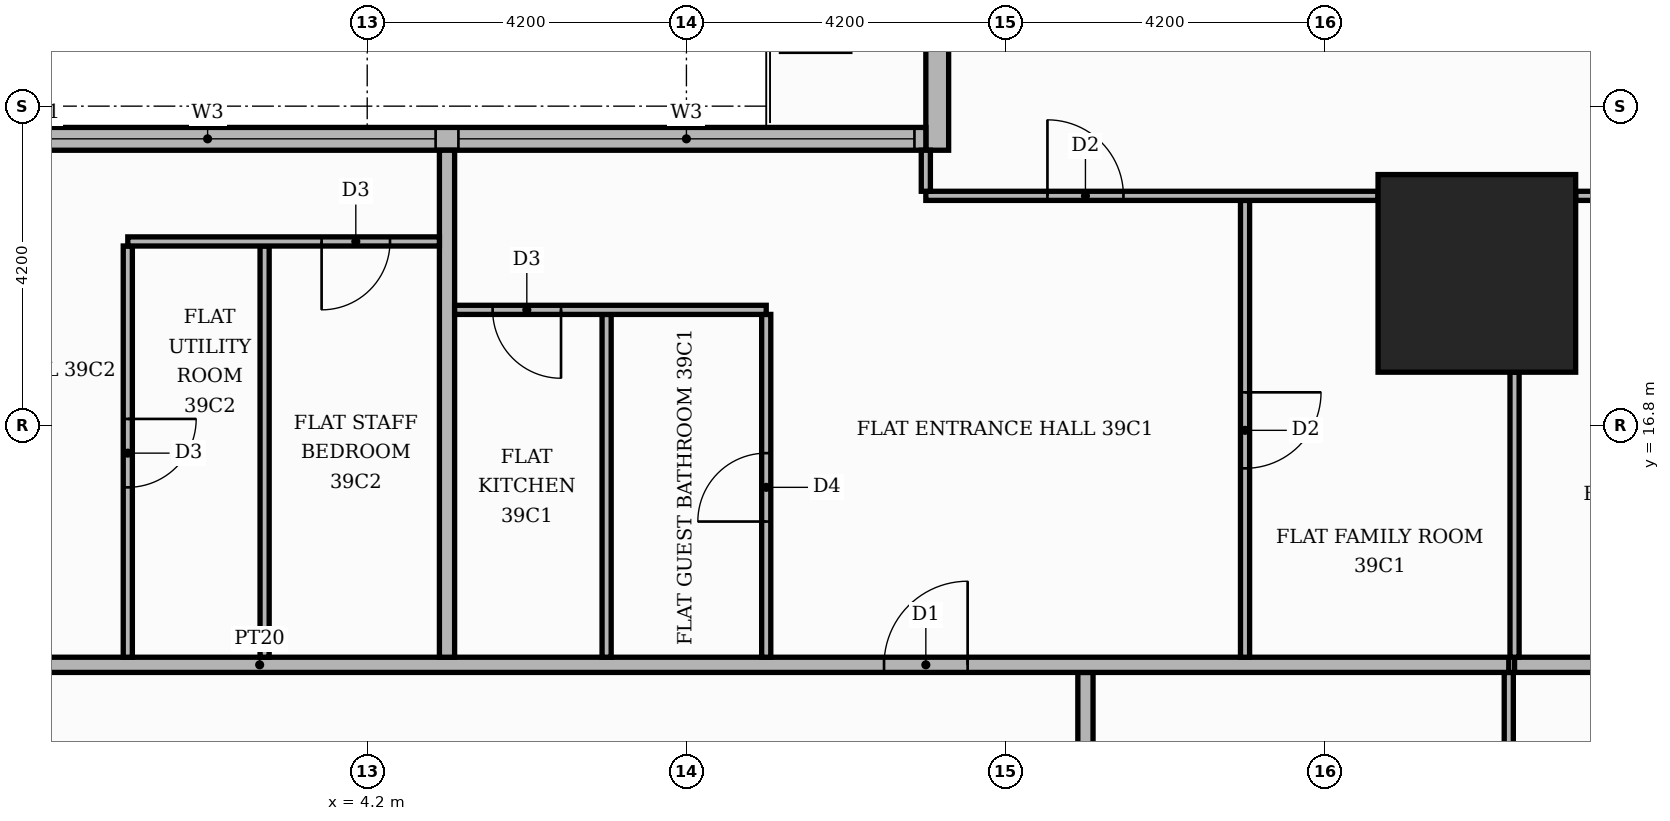
"""IFC4 building model, lengths in metres.
Left out: names, types, materials, properties, quantities, classifications, styles, units other than length and angle.
Written with IfcOpenShell. Run it as: python <this file> out.ifc"""

import sys

from ifc_helpers import new_model, si_unit, direction, frame, frame_2d, origin, origin_2d, place, context, subcontext, project, spatial, rectangle, extrude, element, fill, save


model = new_model("IFC4")
c1 = context("Model", 3, precision=1e-05, world=origin(), true_north=direction((0.0, 1.0)))
c2 = subcontext(c1, "Body", "Model", "MODEL_VIEW")
j1 = project(units=[si_unit("LENGTHUNIT", "METRE"), si_unit("PLANEANGLEUNIT", "RADIAN")], contexts=[c1])
p1 = place(None, origin())
s1 = spatial("IfcSite", under=j1, at=p1, CompositionType="ELEMENT")
p2 = place(p1, origin())
s2 = spatial("IfcBuilding", under=s1, at=p2, CompositionType="ELEMENT")
p3 = place(p2, frame((0.0, 0.0, 165.0)))
s3 = spatial("IfcBuildingStorey", under=s2, at=p3, CompositionType="ELEMENT", Elevation=165.0)
p4 = place(p3, frame((18.8, 18.8, 0.0), z_axis=(0.0, 0.0, 1.0), x_axis=(1.0, 0.0, 0.0)))
e1 = element("IfcColumn", 1, at=p4, inside=s3, PredefinedType="COLUMN", context=c2, shape_type="SweptSolid", body=[
    extrude(rectangle(XDim=2.6, YDim=2.6, at=origin_2d()), origin(), (0.0, 0.0, 1.0), 3.9),
])
p5 = place(p3, frame((11.7, 25.42, 0.0), z_axis=(0.0, 0.0, 1.0), x_axis=(0.0, -1.0, 0.0)))
e2 = element("IfcWall", 2, at=p5, inside=s3, PredefinedType="STANDARD", context=c2, shape_type="SweptSolid", body=[
    extrude(rectangle(XDim=5.0, YDim=0.3, at=frame_2d((2.5, 0.0))), origin(), (0.0, 0.0, 1.0), 3.48),
])
p6 = place(p5, frame((1.42, 0.0, 0.0)))
e3 = element("IfcOpeningElement", 3, at=p6, cuts=e2, PredefinedType="OPENING", context=c2, shape_type="SweptSolid", body=[
    extrude(rectangle(XDim=1.8, YDim=2.4, at=frame_2d((0.9, 1.2))), frame((0.0, 0.16, 0.0), z_axis=(0.0, -1.0, 0.0), x_axis=(1.0, 0.0, 0.0)), (0.0, 0.0, 1.0), 0.32),
])
p7 = place(p3, frame((11.55, 20.57, 0.0), z_axis=(0.0, 0.0, 1.0), x_axis=(-1.0, 0.0, 0.0)))
e4 = element("IfcWall", 4, at=p7, inside=s3, PredefinedType="STANDARD", context=c2, shape_type="SweptSolid", body=[
    extrude(rectangle(XDim=23.4, YDim=0.3, at=frame_2d((11.7, 0.0))), origin(), (0.0, 0.0, 1.0), 3.48),
])
p8 = place(p7, frame((0.15, 0.0, 0.9)))
e5 = element("IfcOpeningElement", 5, at=p8, cuts=e4, PredefinedType="OPENING", context=c2, shape_type="SweptSolid", body=[
    extrude(rectangle(XDim=6.0, YDim=2.1, at=frame_2d((3.0, 1.05))), frame((0.0, 0.16, 0.0), z_axis=(0.0, -1.0, 0.0), x_axis=(1.0, 0.0, 0.0)), (0.0, 0.0, 1.0), 0.32),
])
p9 = place(p7, frame((6.45, 0.0, 0.9)))
e6 = element("IfcOpeningElement", 6, at=p9, cuts=e4, PredefinedType="OPENING", context=c2, shape_type="SweptSolid", body=[
    extrude(rectangle(XDim=6.0, YDim=2.1, at=frame_2d((3.0, 1.05))), frame((0.0, 0.16, 0.0), z_axis=(0.0, -1.0, 0.0), x_axis=(1.0, 0.0, 0.0)), (0.0, 0.0, 1.0), 0.32),
])
p10 = place(p7, frame((12.75, 0.0, 0.9)))
e7 = element("IfcOpeningElement", 7, at=p10, cuts=e4, PredefinedType="OPENING", context=c2, shape_type="SweptSolid", body=[
    extrude(rectangle(XDim=6.0, YDim=2.1, at=frame_2d((3.0, 1.05))), frame((0.0, 0.16, 0.0), z_axis=(0.0, -1.0, 0.0), x_axis=(1.0, 0.0, 0.0)), (0.0, 0.0, 1.0), 0.32),
])
p11 = place(p7, frame((19.05, 0.0, 0.9)))
e8 = element("IfcOpeningElement", 8, at=p11, cuts=e4, PredefinedType="OPENING", context=c2, shape_type="SweptSolid", body=[
    extrude(rectangle(XDim=3.9, YDim=2.1, at=frame_2d((1.95, 1.05))), frame((0.0, 0.16, 0.0), z_axis=(0.0, -1.0, 0.0), x_axis=(1.0, 0.0, 0.0)), (0.0, 0.0, 1.0), 0.32),
])
p12 = place(p3, frame((19.22, 9.21, 0.0), z_axis=(0.0, 0.0, 1.0), x_axis=(0.0, 1.0, 0.0)))
e9 = element("IfcWall", 9, at=p12, inside=s3, PredefinedType="PARTITIONING", context=c2, shape_type="SweptSolid", body=[
    extrude(rectangle(XDim=4.34, YDim=0.12, at=frame_2d((2.17, 0.0))), origin(), (0.0, 0.0, 1.0), 3.48),
])
p13 = place(p12, frame((1.74, 0.0, 0.0)))
e10 = element("IfcOpeningElement", 10, at=p13, cuts=e9, PredefinedType="OPENING", context=c2, shape_type="SweptSolid", body=[
    extrude(rectangle(XDim=0.9, YDim=2.1, at=frame_2d((0.45, 1.05))), frame((0.0, 0.07, 0.0), z_axis=(0.0, -1.0, 0.0), x_axis=(1.0, 0.0, 0.0)), (0.0, 0.0, 1.0), 0.14),
])
p14 = place(p3, frame((13.65, 11.1, 0.0), z_axis=(0.0, 0.0, 1.0), x_axis=(0.0, 1.0, 0.0)))
e11 = element("IfcWall", 11, at=p14, inside=s3, PredefinedType="PARTITIONING", context=c2, shape_type="SweptSolid", body=[
    extrude(rectangle(XDim=2.45, YDim=0.2, at=frame_2d((1.225, 0.0))), origin(), (0.0, 0.0, 1.0), 3.48),
])
p15 = place(p3, frame((-13.65, 13.65, 0.0), z_axis=(0.0, 0.0, 1.0), x_axis=(1.0, 0.0, 0.0)))
e12 = element("IfcWall", 12, at=p15, inside=s3, PredefinedType="PARTITIONING", context=c2, shape_type="SweptSolid", body=[
    extrude(rectangle(XDim=32.87, YDim=0.2, at=frame_2d((16.435, 0.0))), origin(), (0.0, 0.0, 1.0), 3.48),
])
p16 = place(p15, frame((24.65, 0.0, 0.0)))
e13 = element("IfcOpeningElement", 13, at=p16, cuts=e12, PredefinedType="OPENING", context=c2, shape_type="SweptSolid", body=[
    extrude(rectangle(XDim=1.1, YDim=2.4, at=frame_2d((0.55, 1.2))), frame((0.0, 0.11, 0.0), z_axis=(0.0, -1.0, 0.0), x_axis=(1.0, 0.0, 0.0)), (0.0, 0.0, 1.0), 0.22),
])
p17 = place(p15, frame((12.05, 0.0, 0.0)))
e14 = element("IfcOpeningElement", 14, at=p17, cuts=e12, PredefinedType="OPENING", context=c2, shape_type="SweptSolid", body=[
    extrude(rectangle(XDim=1.1, YDim=2.4, at=frame_2d((0.55, 1.2))), frame((0.0, 0.11, 0.0), z_axis=(0.0, -1.0, 0.0), x_axis=(1.0, 0.0, 0.0)), (0.0, 0.0, 1.0), 0.22),
])
p18 = place(p3, frame((19.296, 13.65, 0.0), z_axis=(0.0, 0.0, 1.0), x_axis=(1.0, 0.0, 0.0)))
e15 = element("IfcWall", 15, at=p18, inside=s3, PredefinedType="PARTITIONING", context=c2, shape_type="SweptSolid", body=[
    extrude(rectangle(XDim=6.124, YDim=0.2, at=frame_2d((3.062, 0.0))), origin(), (0.0, 0.0, 1.0), 3.48),
])
p19 = place(p3, frame((1.05, 13.75, 0.0), z_axis=(0.0, 0.0, 1.0), x_axis=(0.0, 1.0, 0.0)))
e16 = element("IfcWall", 16, at=p19, inside=s3, PredefinedType="PARTITIONING", context=c2, shape_type="SweptSolid", body=[
    extrude(rectangle(XDim=5.41, YDim=0.12, at=frame_2d((2.705, 0.0))), origin(), (0.0, 0.0, 1.0), 3.48),
])
p20 = place(p19, frame((2.235, 0.0, 0.0)))
e17 = element("IfcOpeningElement", 17, at=p20, cuts=e16, PredefinedType="OPENING", context=c2, shape_type="SweptSolid", body=[
    extrude(rectangle(XDim=0.9, YDim=2.1, at=frame_2d((0.45, 1.05))), frame((0.0, 0.07, 0.0), z_axis=(0.0, -1.0, 0.0), x_axis=(1.0, 0.0, 0.0)), (0.0, 0.0, 1.0), 0.14),
])
p21 = place(p3, frame((2.85, 13.75, 0.0), z_axis=(0.0, 0.0, 1.0), x_axis=(0.0, 1.0, 0.0)))
e18 = element("IfcWall", 18, at=p21, inside=s3, PredefinedType="PARTITIONING", context=c2, shape_type="SweptSolid", body=[
    extrude(rectangle(XDim=5.41, YDim=0.12, at=frame_2d((2.705, 0.0))), origin(), (0.0, 0.0, 1.0), 3.48),
])
p22 = place(p3, frame((5.25, 13.75, 0.0), z_axis=(0.0, 0.0, 1.0), x_axis=(0.0, 1.0, 0.0)))
e19 = element("IfcWall", 19, at=p22, inside=s3, PredefinedType="PARTITIONING", context=c2, shape_type="SweptSolid", body=[
    extrude(rectangle(XDim=6.67, YDim=0.2, at=frame_2d((3.335, 0.0))), origin(), (0.0, 0.0, 1.0), 3.48),
])
p23 = place(p3, frame((7.35, 13.75, 0.0), z_axis=(0.0, 0.0, 1.0), x_axis=(0.0, 1.0, 0.0)))
e20 = element("IfcWall", 20, at=p23, inside=s3, PredefinedType="PARTITIONING", context=c2, shape_type="SweptSolid", body=[
    extrude(rectangle(XDim=4.51, YDim=0.12, at=frame_2d((2.255, 0.0))), origin(), (0.0, 0.0, 1.0), 3.48),
])
p24 = place(p3, frame((9.45, 13.75, 0.0), z_axis=(0.0, 0.0, 1.0), x_axis=(0.0, 1.0, 0.0)))
e21 = element("IfcWall", 21, at=p24, inside=s3, PredefinedType="PARTITIONING", context=c2, shape_type="SweptSolid", body=[
    extrude(rectangle(XDim=4.51, YDim=0.12, at=frame_2d((2.255, 0.0))), origin(), (0.0, 0.0, 1.0), 3.48),
])
p25 = place(p24, frame((1.785, 0.0, 0.0)))
e22 = element("IfcOpeningElement", 22, at=p25, cuts=e21, PredefinedType="OPENING", context=c2, shape_type="SweptSolid", body=[
    extrude(rectangle(XDim=0.9, YDim=2.1, at=frame_2d((0.45, 1.05))), frame((0.0, 0.07, 0.0), z_axis=(0.0, -1.0, 0.0), x_axis=(1.0, 0.0, 0.0)), (0.0, 0.0, 1.0), 0.14),
])
p26 = place(p3, frame((15.75, 13.75, 0.0), z_axis=(0.0, 0.0, 1.0), x_axis=(0.0, 1.0, 0.0)))
e23 = element("IfcWall", 23, at=p26, inside=s3, PredefinedType="PARTITIONING", context=c2, shape_type="SweptSolid", body=[
    extrude(rectangle(XDim=6.01, YDim=0.12, at=frame_2d((3.005, 0.0))), origin(), (0.0, 0.0, 1.0), 3.48),
])
p27 = place(p26, frame((2.485, 0.0, 0.0)))
e24 = element("IfcOpeningElement", 24, at=p27, cuts=e23, PredefinedType="OPENING", context=c2, shape_type="SweptSolid", body=[
    extrude(rectangle(XDim=1.0, YDim=2.1, at=frame_2d((0.5, 1.05))), frame((0.0, 0.07, 0.0), z_axis=(0.0, -1.0, 0.0), x_axis=(1.0, 0.0, 0.0)), (0.0, 0.0, 1.0), 0.14),
])
p28 = place(p3, frame((19.296, 13.75, 0.0), z_axis=(0.0, 0.0, 1.0), x_axis=(0.0, 1.0, 0.0)))
e25 = element("IfcWall", 25, at=p28, inside=s3, PredefinedType="PARTITIONING", context=c2, shape_type="SweptSolid", body=[
    extrude(rectangle(XDim=3.75, YDim=0.12, at=frame_2d((1.875, 0.0))), origin(), (0.0, 0.0, 1.0), 3.48),
])
p29 = place(p3, frame((5.35, 18.32, 0.0), z_axis=(0.0, 0.0, 1.0), x_axis=(1.0, 0.0, 0.0)))
e26 = element("IfcWall", 26, at=p29, inside=s3, PredefinedType="PARTITIONING", context=c2, shape_type="SweptSolid", body=[
    extrude(rectangle(XDim=4.1, YDim=0.12, at=frame_2d((2.05, 0.0))), origin(), (0.0, 0.0, 1.0), 3.48),
])
p30 = place(p29, frame((0.5, 0.0, 0.0)))
e27 = element("IfcOpeningElement", 27, at=p30, cuts=e26, PredefinedType="OPENING", context=c2, shape_type="SweptSolid", body=[
    extrude(rectangle(XDim=0.9, YDim=2.1, at=frame_2d((0.45, 1.05))), frame((0.0, 0.07, 0.0), z_axis=(0.0, -1.0, 0.0), x_axis=(1.0, 0.0, 0.0)), (0.0, 0.0, 1.0), 0.14),
])
p31 = place(p3, frame((1.05, 19.22, 0.0), z_axis=(0.0, 0.0, 1.0), x_axis=(1.0, 0.0, 0.0)))
e28 = element("IfcWall", 28, at=p31, inside=s3, PredefinedType="PARTITIONING", context=c2, shape_type="SweptSolid", body=[
    extrude(rectangle(XDim=4.1, YDim=0.12, at=frame_2d((2.05, 0.0))), origin(), (0.0, 0.0, 1.0), 3.48),
])
p32 = place(p31, frame((2.55, 0.0, 0.0)))
e29 = element("IfcOpeningElement", 29, at=p32, cuts=e28, PredefinedType="OPENING", context=c2, shape_type="SweptSolid", body=[
    extrude(rectangle(XDim=0.9, YDim=2.1, at=frame_2d((0.45, 1.05))), frame((0.0, 0.07, 0.0), z_axis=(0.0, -1.0, 0.0), x_axis=(1.0, 0.0, 0.0)), (0.0, 0.0, 1.0), 0.14),
])
p33 = place(p3, frame((11.55, 19.82, 0.0), z_axis=(0.0, 0.0, 1.0), x_axis=(1.0, 0.0, 0.0)))
e30 = element("IfcWall", 30, at=p33, inside=s3, PredefinedType="PARTITIONING", context=c2, shape_type="SweptSolid", body=[
    extrude(rectangle(XDim=5.95, YDim=0.12, at=frame_2d((2.975, 0.0))), origin(), (0.0, 0.0, 1.0), 3.48),
])
p34 = place(p33, frame((1.6, 0.0, 0.0)))
e31 = element("IfcOpeningElement", 31, at=p34, cuts=e30, PredefinedType="OPENING", context=c2, shape_type="SweptSolid", body=[
    extrude(rectangle(XDim=1.0, YDim=2.1, at=frame_2d((0.5, 1.05))), frame((0.0, 0.07, 0.0), z_axis=(0.0, -1.0, 0.0), x_axis=(1.0, 0.0, 0.0)), (0.0, 0.0, 1.0), 0.14),
])
p35 = place(p3, frame((20.1, 19.82, 0.0), z_axis=(0.0, 0.0, 1.0), x_axis=(1.0, 0.0, 0.0)))
e32 = element("IfcWall", 32, at=p35, inside=s3, PredefinedType="PARTITIONING", context=c2, shape_type="SweptSolid", body=[
    extrude(rectangle(XDim=5.32, YDim=0.12, at=frame_2d((2.66, 0.0))), origin(), (0.0, 0.0, 1.0), 3.48),
])
p36 = place(p35, frame((2.36, 0.0, 0.0)))
e33 = element("IfcOpeningElement", 33, at=p36, cuts=e32, PredefinedType="OPENING", context=c2, shape_type="SweptSolid", body=[
    extrude(rectangle(XDim=0.9, YDim=2.1, at=frame_2d((0.45, 1.05))), frame((0.0, 0.07, 0.0), z_axis=(0.0, -1.0, 0.0), x_axis=(1.0, 0.0, 0.0)), (0.0, 0.0, 1.0), 0.14),
])
p37 = place(p3, frame((11.55, 19.88, 0.0), z_axis=(0.0, 0.0, 1.0), x_axis=(0.0, 1.0, 0.0)))
e34 = element("IfcWall", 34, at=p37, inside=s3, PredefinedType="PARTITIONING", context=c2, shape_type="SweptSolid", body=[
    extrude(rectangle(XDim=0.54, YDim=0.12, at=frame_2d((0.27, 0.0))), origin(), (0.0, 0.0, 1.0), 3.48),
])
p38 = place(p8, origin())
e35 = element("IfcWindow", 35, at=p38, inside=s3, PartitioningType="SINGLE_PANEL", PredefinedType="WINDOW", context=c2, shape_type="SweptSolid", body=[
    extrude(rectangle(XDim=6.0, YDim=2.1, at=frame_2d((3.0, 1.05))), frame((0.0, 0.03, 0.0), z_axis=(0.0, -1.0, 0.0), x_axis=(1.0, 0.0, 0.0)), (0.0, 0.0, 1.0), 0.06),
])
fill(e5, e35)
p39 = place(p9, origin())
e36 = element("IfcWindow", 36, at=p39, inside=s3, PartitioningType="SINGLE_PANEL", PredefinedType="WINDOW", context=c2, shape_type="SweptSolid", body=[
    extrude(rectangle(XDim=6.0, YDim=2.1, at=frame_2d((3.0, 1.05))), frame((0.0, 0.03, 0.0), z_axis=(0.0, -1.0, 0.0), x_axis=(1.0, 0.0, 0.0)), (0.0, 0.0, 1.0), 0.06),
])
fill(e6, e36)
p40 = place(p16, origin())
e37 = element("IfcDoor", 37, at=p40, inside=s3, OperationType="SINGLE_SWING_RIGHT", PredefinedType="DOOR", context=c2, shape_type="SweptSolid", body=[
    extrude(rectangle(XDim=1.1, YDim=2.4, at=frame_2d((0.55, 1.2))), frame((0.0, 0.025, 0.0), z_axis=(0.0, -1.0, 0.0), x_axis=(1.0, 0.0, 0.0)), (0.0, 0.0, 1.0), 0.05),
])
fill(e13, e37)
p41 = place(p27, frame((1.0, 0.0, 0.0), z_axis=(0.0, 0.0, 1.0), x_axis=(-1.0, 0.0, 0.0)))
e38 = element("IfcDoor", 38, at=p41, inside=s3, OperationType="SINGLE_SWING_RIGHT", PredefinedType="DOOR", context=c2, shape_type="SweptSolid", body=[
    extrude(rectangle(XDim=1.0, YDim=2.1, at=frame_2d((0.5, 1.05))), frame((0.0, 0.025, 0.0), z_axis=(0.0, -1.0, 0.0), x_axis=(1.0, 0.0, 0.0)), (0.0, 0.0, 1.0), 0.05),
])
fill(e24, e38)
p42 = place(p25, origin())
e39 = element("IfcDoor", 39, at=p42, inside=s3, OperationType="SINGLE_SWING_LEFT", PredefinedType="DOOR", context=c2, shape_type="SweptSolid", body=[
    extrude(rectangle(XDim=0.9, YDim=2.1, at=frame_2d((0.45, 1.05))), frame((0.0, 0.025, 0.0), z_axis=(0.0, -1.0, 0.0), x_axis=(1.0, 0.0, 0.0)), (0.0, 0.0, 1.0), 0.05),
])
fill(e22, e39)
p43 = place(p30, frame((0.9, 0.0, 0.0), z_axis=(0.0, 0.0, 1.0), x_axis=(-1.0, 0.0, 0.0)))
e40 = element("IfcDoor", 40, at=p43, inside=s3, OperationType="SINGLE_SWING_RIGHT", PredefinedType="DOOR", context=c2, shape_type="SweptSolid", body=[
    extrude(rectangle(XDim=0.9, YDim=2.1, at=frame_2d((0.45, 1.05))), frame((0.0, 0.025, 0.0), z_axis=(0.0, -1.0, 0.0), x_axis=(1.0, 0.0, 0.0)), (0.0, 0.0, 1.0), 0.05),
])
fill(e27, e40)
p44 = place(p34, origin())
e41 = element("IfcDoor", 41, at=p44, inside=s3, OperationType="SINGLE_SWING_LEFT", PredefinedType="DOOR", context=c2, shape_type="SweptSolid", body=[
    extrude(rectangle(XDim=1.0, YDim=2.1, at=frame_2d((0.5, 1.05))), frame((0.0, 0.025, 0.0), z_axis=(0.0, -1.0, 0.0), x_axis=(1.0, 0.0, 0.0)), (0.0, 0.0, 1.0), 0.05),
])
fill(e31, e41)
p45 = place(p32, frame((0.9, 0.0, 0.0), z_axis=(0.0, 0.0, 1.0), x_axis=(-1.0, 0.0, 0.0)))
e42 = element("IfcDoor", 42, at=p45, inside=s3, OperationType="SINGLE_SWING_LEFT", PredefinedType="DOOR", context=c2, shape_type="SweptSolid", body=[
    extrude(rectangle(XDim=0.9, YDim=2.1, at=frame_2d((0.45, 1.05))), frame((0.0, 0.025, 0.0), z_axis=(0.0, -1.0, 0.0), x_axis=(1.0, 0.0, 0.0)), (0.0, 0.0, 1.0), 0.05),
])
fill(e29, e42)
p46 = place(p20, frame((0.9, 0.0, 0.0), z_axis=(0.0, 0.0, 1.0), x_axis=(-1.0, 0.0, 0.0)))
e43 = element("IfcDoor", 43, at=p46, inside=s3, OperationType="SINGLE_SWING_RIGHT", PredefinedType="DOOR", context=c2, shape_type="SweptSolid", body=[
    extrude(rectangle(XDim=0.9, YDim=2.1, at=frame_2d((0.45, 1.05))), frame((0.0, 0.025, 0.0), z_axis=(0.0, -1.0, 0.0), x_axis=(1.0, 0.0, 0.0)), (0.0, 0.0, 1.0), 0.05),
])
fill(e17, e43)
save(model, sys.argv[1])
